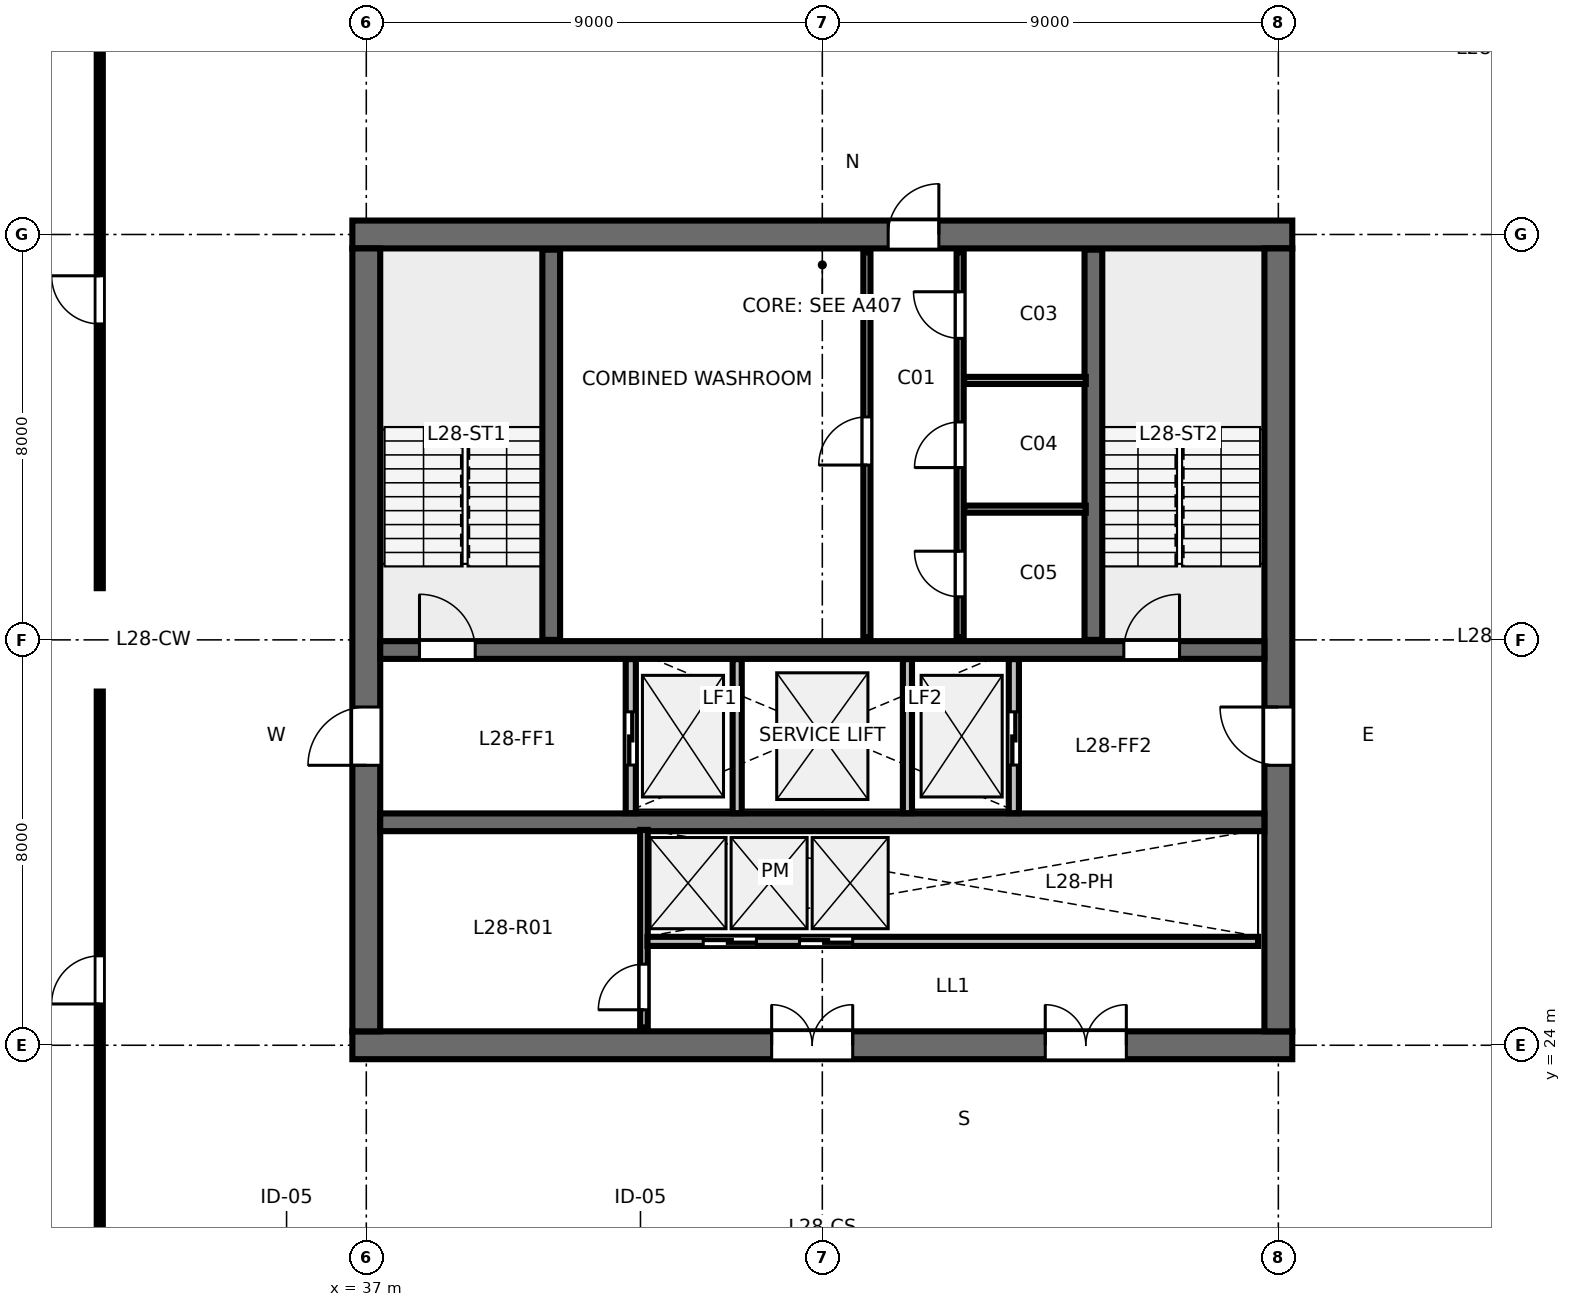
"""IFC4 building model, lengths in metres.
Left out: names, types, materials, properties, quantities, classifications, styles, units other than length and angle.
Written with IfcOpenShell. Run it as: python <this file> out.ifc"""

import sys

from ifc_helpers import new_model, si_unit, direction, frame, frame_2d, origin, place, context, subcontext, project, spatial, rectangle, extrude, element, fill, save


model = new_model("IFC4")
c1 = context("Model", 3, precision=1e-05, world=origin(), true_north=direction((0.0, 1.0)))
c2 = subcontext(c1, "Body", "Model", "MODEL_VIEW")
j1 = project(units=[si_unit("LENGTHUNIT", "METRE"), si_unit("PLANEANGLEUNIT", "RADIAN")], contexts=[c1])
p1 = place(None, origin())
s1 = spatial("IfcSite", under=j1, at=p1, CompositionType="ELEMENT")
p2 = place(p1, origin())
s2 = spatial("IfcBuilding", under=s1, at=p2, CompositionType="ELEMENT")
p3 = place(p2, frame((0.0, 0.0, 109.6)))
s3 = spatial("IfcBuildingStorey", under=s2, at=p3, CompositionType="ELEMENT", Elevation=109.6)
p4 = place(p3, frame((36.725, 24.0, 0.0), z_axis=(0.0, 0.0, 1.0), x_axis=(1.0, 0.0, 0.0)))
e1 = element("IfcWall", 1, at=p4, inside=s3, PredefinedType="SHEAR", context=c2, shape_type="SweptSolid", body=[
    extrude(rectangle(XDim=18.55, YDim=0.55, at=frame_2d((9.275, 0.0))), origin(), (0.0, 0.0, 1.0), 3.36),
])
p5 = place(p4, frame((8.275, 0.0, 0.0)))
e2 = element("IfcOpeningElement", 2, at=p5, cuts=e1, PredefinedType="OPENING", context=c2, shape_type="SweptSolid", body=[
    extrude(rectangle(XDim=1.6, YDim=2.15, at=frame_2d((0.8, 1.075))), frame((0.0, 0.285, 0.0), z_axis=(0.0, -1.0, 0.0), x_axis=(1.0, 0.0, 0.0)), (0.0, 0.0, 1.0), 0.57),
])
p6 = place(p4, frame((13.675, 0.0, 0.0)))
e3 = element("IfcOpeningElement", 3, at=p6, cuts=e1, PredefinedType="OPENING", context=c2, shape_type="SweptSolid", body=[
    extrude(rectangle(XDim=1.6, YDim=2.15, at=frame_2d((0.8, 1.075))), frame((0.0, 0.285, 0.0), z_axis=(0.0, -1.0, 0.0), x_axis=(1.0, 0.0, 0.0)), (0.0, 0.0, 1.0), 0.57),
])
p7 = place(p3, frame((36.725, 40.0, 0.0), z_axis=(0.0, 0.0, 1.0), x_axis=(1.0, 0.0, 0.0)))
e4 = element("IfcWall", 4, at=p7, inside=s3, PredefinedType="SHEAR", context=c2, shape_type="SweptSolid", body=[
    extrude(rectangle(XDim=18.55, YDim=0.55, at=frame_2d((9.275, 0.0))), origin(), (0.0, 0.0, 1.0), 3.36),
])
p8 = place(p7, frame((10.575, 0.0, 0.0)))
e5 = element("IfcOpeningElement", 5, at=p8, cuts=e4, PredefinedType="OPENING", context=c2, shape_type="SweptSolid", body=[
    extrude(rectangle(XDim=1.0, YDim=2.15, at=frame_2d((0.5, 1.075))), frame((0.0, 0.285, 0.0), z_axis=(0.0, -1.0, 0.0), x_axis=(1.0, 0.0, 0.0)), (0.0, 0.0, 1.0), 0.57),
])
p9 = place(p3, frame((37.0, 24.275, 0.0), z_axis=(0.0, 0.0, 1.0), x_axis=(0.0, 1.0, 0.0)))
e6 = element("IfcWall", 6, at=p9, inside=s3, PredefinedType="SHEAR", context=c2, shape_type="SweptSolid", body=[
    extrude(rectangle(XDim=15.45, YDim=0.55, at=frame_2d((7.725, 0.0))), origin(), (0.0, 0.0, 1.0), 3.36),
])
p10 = place(p9, frame((5.25, 0.0, 0.0)))
e7 = element("IfcOpeningElement", 7, at=p10, cuts=e6, PredefinedType="OPENING", context=c2, shape_type="SweptSolid", body=[
    extrude(rectangle(XDim=1.15, YDim=2.15, at=frame_2d((0.575, 1.075))), frame((0.0, 0.285, 0.0), z_axis=(0.0, -1.0, 0.0), x_axis=(1.0, 0.0, 0.0)), (0.0, 0.0, 1.0), 0.57),
])
p11 = place(p3, frame((55.0, 24.275, 0.0), z_axis=(0.0, 0.0, 1.0), x_axis=(0.0, 1.0, 0.0)))
e8 = element("IfcWall", 8, at=p11, inside=s3, PredefinedType="SHEAR", context=c2, shape_type="SweptSolid", body=[
    extrude(rectangle(XDim=15.45, YDim=0.55, at=frame_2d((7.725, 0.0))), origin(), (0.0, 0.0, 1.0), 3.36),
])
p12 = place(p11, frame((5.25, 0.0, 0.0)))
e9 = element("IfcOpeningElement", 9, at=p12, cuts=e8, PredefinedType="OPENING", context=c2, shape_type="SweptSolid", body=[
    extrude(rectangle(XDim=1.15, YDim=2.15, at=frame_2d((0.575, 1.075))), frame((0.0, 0.285, 0.0), z_axis=(0.0, -1.0, 0.0), x_axis=(1.0, 0.0, 0.0)), (0.0, 0.0, 1.0), 0.57),
])
p13 = place(p3, frame((37.275, 31.8, 0.0), z_axis=(0.0, 0.0, 1.0), x_axis=(1.0, 0.0, 0.0)))
e10 = element("IfcWall", 10, at=p13, inside=s3, PredefinedType="SHEAR", context=c2, shape_type="SweptSolid", body=[
    extrude(rectangle(XDim=17.45, YDim=0.35, at=frame_2d((8.725, 0.0))), origin(), (0.0, 0.0, 1.0), 3.36),
])
p14 = place(p13, frame((0.775, 0.0, 0.0)))
e11 = element("IfcOpeningElement", 11, at=p14, cuts=e10, PredefinedType="OPENING", context=c2, shape_type="SweptSolid", body=[
    extrude(rectangle(XDim=1.1, YDim=2.15, at=frame_2d((0.55, 1.075))), frame((0.0, 0.185, 0.0), z_axis=(0.0, -1.0, 0.0), x_axis=(1.0, 0.0, 0.0)), (0.0, 0.0, 1.0), 0.37),
])
p15 = place(p13, frame((14.675, 0.0, 0.0)))
e12 = element("IfcOpeningElement", 12, at=p15, cuts=e10, PredefinedType="OPENING", context=c2, shape_type="SweptSolid", body=[
    extrude(rectangle(XDim=1.1, YDim=2.15, at=frame_2d((0.55, 1.075))), frame((0.0, 0.185, 0.0), z_axis=(0.0, -1.0, 0.0), x_axis=(1.0, 0.0, 0.0)), (0.0, 0.0, 1.0), 0.37),
])
p16 = place(p3, frame((37.275, 28.4, 0.0), z_axis=(0.0, 0.0, 1.0), x_axis=(1.0, 0.0, 0.0)))
e13 = element("IfcWall", 13, at=p16, inside=s3, PredefinedType="SHEAR", context=c2, shape_type="SweptSolid", body=[
    extrude(rectangle(XDim=17.45, YDim=0.35, at=frame_2d((8.725, 0.0))), origin(), (0.0, 0.0, 1.0), 3.36),
])
for number, where, z_axis, x_axis in (
    (14, (40.65, 32.0, 0.0), (0.0, 0.0, 1.0), (0.0, 1.0, 0.0)),
    (15, (51.35, 32.0, 0.0), (0.0, 0.0, 1.0), (0.0, 1.0, 0.0)),
):
    element("IfcWall", number, at=place(p3, frame(where, z_axis=z_axis, x_axis=x_axis)), inside=s3, PredefinedType="SHEAR", context=c2, shape_type="SweptSolid", body=[
        extrude(rectangle(XDim=7.7, YDim=0.35, at=frame_2d((3.85, 0.0))), origin(), (0.0, 0.0, 1.0), 3.6),
    ])
p17 = place(p3, frame((46.88, 32.05, 0.0), z_axis=(0.0, 0.0, 1.0), x_axis=(0.0, 1.0, 0.0)))
e16 = element("IfcWall", 16, at=p17, inside=s3, PredefinedType="PARTITIONING", context=c2, shape_type="SweptSolid", body=[
    extrude(rectangle(XDim=7.6, YDim=0.14, at=frame_2d((3.8, 0.0))), origin(), (0.0, 0.0, 1.0), 3.36),
])
p18 = place(p17, frame((3.4, 0.0, 0.0)))
e17 = element("IfcOpeningElement", 17, at=p18, cuts=e16, PredefinedType="OPENING", context=c2, shape_type="SweptSolid", body=[
    extrude(rectangle(XDim=0.95, YDim=2.15, at=frame_2d((0.475, 1.075))), frame((0.0, 0.08, 0.0), z_axis=(0.0, -1.0, 0.0), x_axis=(1.0, 0.0, 0.0)), (0.0, 0.0, 1.0), 0.16),
])
p19 = place(p3, frame((48.72, 32.05, 0.0), z_axis=(0.0, 0.0, 1.0), x_axis=(0.0, 1.0, 0.0)))
e18 = element("IfcWall", 18, at=p19, inside=s3, PredefinedType="PARTITIONING", context=c2, shape_type="SweptSolid", body=[
    extrude(rectangle(XDim=7.6, YDim=0.14, at=frame_2d((3.8, 0.0))), origin(), (0.0, 0.0, 1.0), 3.36),
])
p20 = place(p19, frame((0.8, 0.0, 0.0)))
e19 = element("IfcOpeningElement", 19, at=p20, cuts=e18, PredefinedType="OPENING", context=c2, shape_type="SweptSolid", body=[
    extrude(rectangle(XDim=0.9, YDim=2.15, at=frame_2d((0.45, 1.075))), frame((0.0, 0.08, 0.0), z_axis=(0.0, -1.0, 0.0), x_axis=(1.0, 0.0, 0.0)), (0.0, 0.0, 1.0), 0.16),
])
p21 = place(p19, frame((3.35, 0.0, 0.0)))
e20 = element("IfcOpeningElement", 20, at=p21, cuts=e18, PredefinedType="OPENING", context=c2, shape_type="SweptSolid", body=[
    extrude(rectangle(XDim=0.9, YDim=2.15, at=frame_2d((0.45, 1.075))), frame((0.0, 0.08, 0.0), z_axis=(0.0, -1.0, 0.0), x_axis=(1.0, 0.0, 0.0)), (0.0, 0.0, 1.0), 0.16),
])
p22 = place(p19, frame((5.9, 0.0, 0.0)))
e21 = element("IfcOpeningElement", 21, at=p22, cuts=e18, PredefinedType="OPENING", context=c2, shape_type="SweptSolid", body=[
    extrude(rectangle(XDim=0.92, YDim=2.15, at=frame_2d((0.46, 1.075))), frame((0.0, 0.08, 0.0), z_axis=(0.0, -1.0, 0.0), x_axis=(1.0, 0.0, 0.0)), (0.0, 0.0, 1.0), 0.16),
])
for number, where, z_axis, x_axis in (
    (22, (48.8, 34.58, 0.0), (0.0, 0.0, 1.0), (1.0, 0.0, 0.0)),
    (23, (48.8, 37.12, 0.0), (0.0, 0.0, 1.0), (1.0, 0.0, 0.0)),
):
    element("IfcWall", number, at=place(p3, frame(where, z_axis=z_axis, x_axis=x_axis)), inside=s3, PredefinedType="PARTITIONING", context=c2, shape_type="SweptSolid", body=[
        extrude(rectangle(XDim=2.4, YDim=0.14, at=frame_2d((1.2, 0.0))), origin(), (0.0, 0.0, 1.0), 3.36),
    ])
p23 = place(p3, frame((42.22, 28.58, 0.0), z_axis=(0.0, 0.0, 1.0), x_axis=(0.0, 1.0, 0.0)))
e24 = element("IfcWall", 24, at=p23, inside=s3, PredefinedType="PARTITIONING", context=c2, shape_type="SweptSolid", body=[
    extrude(rectangle(XDim=3.04, YDim=0.2, at=frame_2d((1.52, 0.0))), origin(), (0.0, 0.0, 1.0), 3.36),
])
p24 = place(p23, frame((0.95, 0.0, 0.0)))
e25 = element("IfcOpeningElement", 25, at=p24, cuts=e24, PredefinedType="OPENING", context=c2, shape_type="SweptSolid", body=[
    extrude(rectangle(XDim=1.05, YDim=2.15, at=frame_2d((0.525, 1.075))), frame((0.0, 0.11, 0.0), z_axis=(0.0, -1.0, 0.0), x_axis=(1.0, 0.0, 0.0)), (0.0, 0.0, 1.0), 0.22),
])
p25 = place(p3, frame((49.78, 28.58, 0.0), z_axis=(0.0, 0.0, 1.0), x_axis=(0.0, 1.0, 0.0)))
e26 = element("IfcWall", 26, at=p25, inside=s3, PredefinedType="PARTITIONING", context=c2, shape_type="SweptSolid", body=[
    extrude(rectangle(XDim=3.04, YDim=0.2, at=frame_2d((1.52, 0.0))), origin(), (0.0, 0.0, 1.0), 3.36),
])
p26 = place(p25, frame((0.95, 0.0, 0.0)))
e27 = element("IfcOpeningElement", 27, at=p26, cuts=e26, PredefinedType="OPENING", context=c2, shape_type="SweptSolid", body=[
    extrude(rectangle(XDim=1.05, YDim=2.15, at=frame_2d((0.525, 1.075))), frame((0.0, 0.11, 0.0), z_axis=(0.0, -1.0, 0.0), x_axis=(1.0, 0.0, 0.0)), (0.0, 0.0, 1.0), 0.22),
])
for number, where, z_axis, x_axis in (
    (28, (44.32, 28.58, 0.0), (0.0, 0.0, 1.0), (0.0, 1.0, 0.0)),
    (29, (47.68, 28.58, 0.0), (0.0, 0.0, 1.0), (0.0, 1.0, 0.0)),
):
    element("IfcWall", number, at=place(p3, frame(where, z_axis=z_axis, x_axis=x_axis)), inside=s3, PredefinedType="PARTITIONING", context=c2, shape_type="SweptSolid", body=[
        extrude(rectangle(XDim=3.04, YDim=0.18, at=frame_2d((1.52, 0.0))), origin(), (0.0, 0.0, 1.0), 3.36),
    ])
p27 = place(p3, frame((42.48, 24.35, 0.0), z_axis=(0.0, 0.0, 1.0), x_axis=(0.0, 1.0, 0.0)))
e30 = element("IfcWall", 30, at=p27, inside=s3, PredefinedType="PARTITIONING", context=c2, shape_type="SweptSolid", body=[
    extrude(rectangle(XDim=3.9, YDim=0.15, at=frame_2d((1.95, 0.0))), origin(), (0.0, 0.0, 1.0), 3.36),
])
p28 = place(p27, frame((0.35, 0.0, 0.0)))
e31 = element("IfcOpeningElement", 31, at=p28, cuts=e30, PredefinedType="OPENING", context=c2, shape_type="SweptSolid", body=[
    extrude(rectangle(XDim=0.9, YDim=2.15, at=frame_2d((0.45, 1.075))), frame((0.0, 0.085, 0.0), z_axis=(0.0, -1.0, 0.0), x_axis=(1.0, 0.0, 0.0)), (0.0, 0.0, 1.0), 0.17),
])
p29 = place(p3, frame((42.55, 26.05, 0.0), z_axis=(0.0, 0.0, 1.0), x_axis=(1.0, 0.0, 0.0)))
e32 = element("IfcWall", 32, at=p29, inside=s3, PredefinedType="PARTITIONING", context=c2, shape_type="SweptSolid", body=[
    extrude(rectangle(XDim=12.05, YDim=0.18, at=frame_2d((6.025, 0.0))), origin(), (0.0, 0.0, 1.0), 3.36),
])
p30 = place(p29, frame((1.1, 0.0, 0.0)))
e33 = element("IfcOpeningElement", 33, at=p30, cuts=e32, PredefinedType="OPENING", context=c2, shape_type="SweptSolid", body=[
    extrude(rectangle(XDim=1.05, YDim=2.15, at=frame_2d((0.525, 1.075))), frame((0.0, 0.1, 0.0), z_axis=(0.0, -1.0, 0.0), x_axis=(1.0, 0.0, 0.0)), (0.0, 0.0, 1.0), 0.2),
])
p31 = place(p29, frame((3.0, 0.0, 0.0)))
e34 = element("IfcOpeningElement", 34, at=p31, cuts=e32, PredefinedType="OPENING", context=c2, shape_type="SweptSolid", body=[
    extrude(rectangle(XDim=1.05, YDim=2.15, at=frame_2d((0.525, 1.075))), frame((0.0, 0.1, 0.0), z_axis=(0.0, -1.0, 0.0), x_axis=(1.0, 0.0, 0.0)), (0.0, 0.0, 1.0), 0.2),
])
p32 = place(p3, frame((31.74, 19.4, 0.0), z_axis=(0.0, 0.0, 1.0), x_axis=(0.0, 1.0, 0.0)))
e35 = element("IfcWall", 35, at=p32, inside=s3, PredefinedType="PARTITIONING", context=c2, shape_type="SweptSolid", body=[
    extrude(rectangle(XDim=11.58, YDim=0.12, at=frame_2d((5.79, 0.0))), origin(), (0.0, 0.0, 1.0), 2.64),
])
p33 = place(p32, frame((5.415, 0.0, 0.0)))
e36 = element("IfcOpeningElement", 36, at=p33, cuts=e35, PredefinedType="OPENING", context=c2, shape_type="SweptSolid", body=[
    extrude(rectangle(XDim=0.95, YDim=2.15, at=frame_2d((0.475, 1.075))), frame((0.0, 0.07, 0.0), z_axis=(0.0, -1.0, 0.0), x_axis=(1.0, 0.0, 0.0)), (0.0, 0.0, 1.0), 0.14),
])
p34 = place(p3, frame((31.74, 33.02, 0.0), z_axis=(0.0, 0.0, 1.0), x_axis=(0.0, 1.0, 0.0)))
e37 = element("IfcWall", 37, at=p34, inside=s3, PredefinedType="PARTITIONING", context=c2, shape_type="SweptSolid", body=[
    extrude(rectangle(XDim=11.58, YDim=0.12, at=frame_2d((5.79, 0.0))), origin(), (0.0, 0.0, 1.0), 2.64),
])
p35 = place(p34, frame((5.215, 0.0, 0.0)))
e38 = element("IfcOpeningElement", 38, at=p35, cuts=e37, PredefinedType="OPENING", context=c2, shape_type="SweptSolid", body=[
    extrude(rectangle(XDim=0.95, YDim=2.15, at=frame_2d((0.475, 1.075))), frame((0.0, 0.07, 0.0), z_axis=(0.0, -1.0, 0.0), x_axis=(1.0, 0.0, 0.0)), (0.0, 0.0, 1.0), 0.14),
])
p36 = place(p14, origin())
e39 = element("IfcDoor", 39, at=p36, inside=s3, OperationType="SINGLE_SWING_LEFT", PredefinedType="DOOR", context=c2, shape_type="SweptSolid", body=[
    extrude(rectangle(XDim=1.1, YDim=2.15, at=frame_2d((0.55, 1.075))), frame((0.0, 0.025, 0.0), z_axis=(0.0, -1.0, 0.0), x_axis=(1.0, 0.0, 0.0)), (0.0, 0.0, 1.0), 0.05),
])
fill(e11, e39)
p37 = place(p15, origin())
e40 = element("IfcDoor", 40, at=p37, inside=s3, OperationType="SINGLE_SWING_RIGHT", PredefinedType="DOOR", context=c2, shape_type="SweptSolid", body=[
    extrude(rectangle(XDim=1.1, YDim=2.15, at=frame_2d((0.55, 1.075))), frame((0.0, 0.025, 0.0), z_axis=(0.0, -1.0, 0.0), x_axis=(1.0, 0.0, 0.0)), (0.0, 0.0, 1.0), 0.05),
])
fill(e12, e40)
p38 = place(p8, origin())
e41 = element("IfcDoor", 41, at=p38, inside=s3, OperationType="SINGLE_SWING_RIGHT", PredefinedType="DOOR", context=c2, shape_type="SweptSolid", body=[
    extrude(rectangle(XDim=1.0, YDim=2.15, at=frame_2d((0.5, 1.075))), frame((0.0, 0.025, 0.0), z_axis=(0.0, -1.0, 0.0), x_axis=(1.0, 0.0, 0.0)), (0.0, 0.0, 1.0), 0.05),
])
fill(e5, e41)
p39 = place(p10, origin())
e42 = element("IfcDoor", 42, at=p39, inside=s3, OperationType="SINGLE_SWING_LEFT", PredefinedType="DOOR", context=c2, shape_type="SweptSolid", body=[
    extrude(rectangle(XDim=1.15, YDim=2.15, at=frame_2d((0.575, 1.075))), frame((0.0, 0.025, 0.0), z_axis=(0.0, -1.0, 0.0), x_axis=(1.0, 0.0, 0.0)), (0.0, 0.0, 1.0), 0.05),
])
fill(e7, e42)
p40 = place(p12, origin())
e43 = element("IfcDoor", 43, at=p40, inside=s3, OperationType="SINGLE_SWING_RIGHT", PredefinedType="DOOR", context=c2, shape_type="SweptSolid", body=[
    extrude(rectangle(XDim=1.15, YDim=2.15, at=frame_2d((0.575, 1.075))), frame((0.0, 0.025, 0.0), z_axis=(0.0, -1.0, 0.0), x_axis=(1.0, 0.0, 0.0)), (0.0, 0.0, 1.0), 0.05),
])
fill(e9, e43)
p41 = place(p5, origin())
e44 = element("IfcDoor", 44, at=p41, inside=s3, OperationType="DOUBLE_DOOR_SINGLE_SWING", PredefinedType="DOOR", context=c2, shape_type="SweptSolid", body=[
    extrude(rectangle(XDim=1.6, YDim=2.15, at=frame_2d((0.8, 1.075))), frame((0.0, 0.025, 0.0), z_axis=(0.0, -1.0, 0.0), x_axis=(1.0, 0.0, 0.0)), (0.0, 0.0, 1.0), 0.05),
])
fill(e2, e44)
p42 = place(p6, origin())
e45 = element("IfcDoor", 45, at=p42, inside=s3, OperationType="DOUBLE_DOOR_SINGLE_SWING", PredefinedType="DOOR", context=c2, shape_type="SweptSolid", body=[
    extrude(rectangle(XDim=1.6, YDim=2.15, at=frame_2d((0.8, 1.075))), frame((0.0, 0.025, 0.0), z_axis=(0.0, -1.0, 0.0), x_axis=(1.0, 0.0, 0.0)), (0.0, 0.0, 1.0), 0.05),
])
fill(e3, e45)
p43 = place(p18, origin())
e46 = element("IfcDoor", 46, at=p43, inside=s3, OperationType="SINGLE_SWING_LEFT", PredefinedType="DOOR", context=c2, shape_type="SweptSolid", body=[
    extrude(rectangle(XDim=0.95, YDim=2.15, at=frame_2d((0.475, 1.075))), frame((0.0, 0.025, 0.0), z_axis=(0.0, -1.0, 0.0), x_axis=(1.0, 0.0, 0.0)), (0.0, 0.0, 1.0), 0.05),
])
fill(e17, e46)
p44 = place(p20, origin())
e47 = element("IfcDoor", 47, at=p44, inside=s3, OperationType="SINGLE_SWING_RIGHT", PredefinedType="DOOR", context=c2, shape_type="SweptSolid", body=[
    extrude(rectangle(XDim=0.9, YDim=2.15, at=frame_2d((0.45, 1.075))), frame((0.0, 0.025, 0.0), z_axis=(0.0, -1.0, 0.0), x_axis=(1.0, 0.0, 0.0)), (0.0, 0.0, 1.0), 0.05),
])
fill(e19, e47)
p45 = place(p21, origin())
e48 = element("IfcDoor", 48, at=p45, inside=s3, OperationType="SINGLE_SWING_LEFT", PredefinedType="DOOR", context=c2, shape_type="SweptSolid", body=[
    extrude(rectangle(XDim=0.9, YDim=2.15, at=frame_2d((0.45, 1.075))), frame((0.0, 0.025, 0.0), z_axis=(0.0, -1.0, 0.0), x_axis=(1.0, 0.0, 0.0)), (0.0, 0.0, 1.0), 0.05),
])
fill(e20, e48)
p46 = place(p22, origin())
e49 = element("IfcDoor", 49, at=p46, inside=s3, OperationType="SINGLE_SWING_RIGHT", PredefinedType="DOOR", context=c2, shape_type="SweptSolid", body=[
    extrude(rectangle(XDim=0.92, YDim=2.15, at=frame_2d((0.46, 1.075))), frame((0.0, 0.025, 0.0), z_axis=(0.0, -1.0, 0.0), x_axis=(1.0, 0.0, 0.0)), (0.0, 0.0, 1.0), 0.05),
])
fill(e21, e49)
p47 = place(p24, origin())
e50 = element("IfcDoor", 50, at=p47, inside=s3, OperationType="SLIDING_TO_LEFT", PredefinedType="DOOR", context=c2, shape_type="SweptSolid", body=[
    extrude(rectangle(XDim=1.05, YDim=2.15, at=frame_2d((0.525, 1.075))), frame((0.0, 0.025, 0.0), z_axis=(0.0, -1.0, 0.0), x_axis=(1.0, 0.0, 0.0)), (0.0, 0.0, 1.0), 0.05),
])
fill(e25, e50)
p48 = place(p26, origin())
e51 = element("IfcDoor", 51, at=p48, inside=s3, OperationType="SLIDING_TO_RIGHT", PredefinedType="DOOR", context=c2, shape_type="SweptSolid", body=[
    extrude(rectangle(XDim=1.05, YDim=2.15, at=frame_2d((0.525, 1.075))), frame((0.0, 0.025, 0.0), z_axis=(0.0, -1.0, 0.0), x_axis=(1.0, 0.0, 0.0)), (0.0, 0.0, 1.0), 0.05),
])
fill(e27, e51)
p49 = place(p28, origin())
e52 = element("IfcDoor", 52, at=p49, inside=s3, OperationType="SINGLE_SWING_LEFT", PredefinedType="DOOR", context=c2, shape_type="SweptSolid", body=[
    extrude(rectangle(XDim=0.9, YDim=2.15, at=frame_2d((0.45, 1.075))), frame((0.0, 0.025, 0.0), z_axis=(0.0, -1.0, 0.0), x_axis=(1.0, 0.0, 0.0)), (0.0, 0.0, 1.0), 0.05),
])
fill(e31, e52)
p50 = place(p30, origin())
e53 = element("IfcDoor", 53, at=p50, inside=s3, OperationType="SLIDING_TO_LEFT", PredefinedType="DOOR", context=c2, shape_type="SweptSolid", body=[
    extrude(rectangle(XDim=1.05, YDim=2.15, at=frame_2d((0.525, 1.075))), frame((0.0, 0.025, 0.0), z_axis=(0.0, -1.0, 0.0), x_axis=(1.0, 0.0, 0.0)), (0.0, 0.0, 1.0), 0.05),
])
fill(e33, e53)
p51 = place(p31, origin())
e54 = element("IfcDoor", 54, at=p51, inside=s3, OperationType="SLIDING_TO_RIGHT", PredefinedType="DOOR", context=c2, shape_type="SweptSolid", body=[
    extrude(rectangle(XDim=1.05, YDim=2.15, at=frame_2d((0.525, 1.075))), frame((0.0, 0.025, 0.0), z_axis=(0.0, -1.0, 0.0), x_axis=(1.0, 0.0, 0.0)), (0.0, 0.0, 1.0), 0.05),
])
fill(e34, e54)
p52 = place(p33, origin())
e55 = element("IfcDoor", 55, at=p52, inside=s3, OperationType="SINGLE_SWING_LEFT", PredefinedType="DOOR", context=c2, shape_type="SweptSolid", body=[
    extrude(rectangle(XDim=0.95, YDim=2.15, at=frame_2d((0.475, 1.075))), frame((0.0, 0.025, 0.0), z_axis=(0.0, -1.0, 0.0), x_axis=(1.0, 0.0, 0.0)), (0.0, 0.0, 1.0), 0.05),
])
fill(e36, e55)
p53 = place(p35, origin())
e56 = element("IfcDoor", 56, at=p53, inside=s3, OperationType="SINGLE_SWING_RIGHT", PredefinedType="DOOR", context=c2, shape_type="SweptSolid", body=[
    extrude(rectangle(XDim=0.95, YDim=2.15, at=frame_2d((0.475, 1.075))), frame((0.0, 0.025, 0.0), z_axis=(0.0, -1.0, 0.0), x_axis=(1.0, 0.0, 0.0)), (0.0, 0.0, 1.0), 0.05),
])
fill(e38, e56)
save(model, sys.argv[1])
